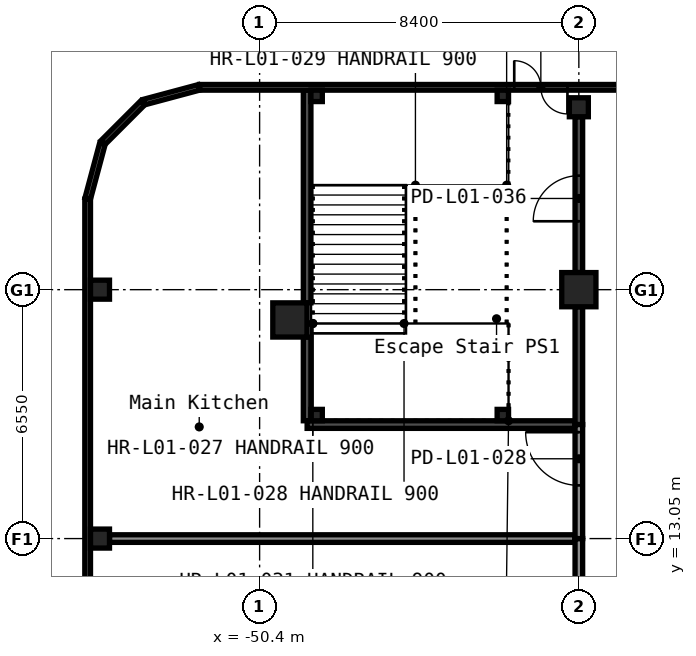
"""IFC4 building model, lengths in metres.
Left out: names, types, materials, properties, quantities, classifications, styles, units other than length and angle.
Written with IfcOpenShell. Run it as: python <this file> out.ifc"""

import sys

from ifc_helpers import new_model, si_unit, direction, frame, frame_2d, origin, origin_2d, place, context, subcontext, project, spatial, rectangle, hollow_rectangle, extrude, element, fill, save


model = new_model("IFC4")
c1 = context("Model", 3, precision=1e-05, world=origin(), true_north=direction((0.0, 1.0)))
c2 = subcontext(c1, "Body", "Model", "MODEL_VIEW")
j1 = project(units=[si_unit("LENGTHUNIT", "METRE"), si_unit("PLANEANGLEUNIT", "RADIAN")], contexts=[c1])
p1 = place(None, origin())
s1 = spatial("IfcSite", under=j1, at=p1, CompositionType="ELEMENT")
p2 = place(p1, origin())
s2 = spatial("IfcBuilding", under=s1, at=p2, CompositionType="ELEMENT")
p3 = place(p2, origin())
s3 = spatial("IfcBuildingStorey", under=s2, at=p3, CompositionType="ELEMENT", Elevation=0.0)
for number, where, z_axis, x_axis in (
    (1, (-49.603, 18.803, -0.3), (0.0, 0.0, 1.0), (1.0, 0.0, 0.0)),
    (2, (-42.0, 19.6, -0.3), (0.0, 0.0, 1.0), (1.0, 0.0, 0.0)),
):
    element("IfcColumn", number, at=place(p3, frame(where, z_axis=z_axis, x_axis=x_axis)), inside=s3, PredefinedType="COLUMN", context=c2, shape_type="SweptSolid", body=[
        extrude(hollow_rectangle(XDim=0.9, YDim=0.9, WallThickness=0.036, at=origin_2d()), origin(), (0.0, 0.0, 1.0), 8.9),
    ])
for number, where, z_axis, x_axis in (
    (3, (-42.0, 24.4, -0.3), (0.0, 0.0, 1.0), (1.0, 0.0, 0.0)),
    (4, (-54.6, 13.05, -0.3), (0.0, 0.0, 1.0), (1.0, 0.0, 0.0)),
    (5, (-54.6, 19.6, -0.3), (0.0, 0.0, 1.0), (1.0, 0.0, 0.0)),
):
    element("IfcColumn", number, at=place(p3, frame(where, z_axis=z_axis, x_axis=x_axis)), inside=s3, PredefinedType="COLUMN", context=c2, shape_type="SweptSolid", body=[
        extrude(hollow_rectangle(XDim=0.5, YDim=0.5, WallThickness=0.019, InnerFilletRadius=0.029, OuterFilletRadius=0.048, at=origin_2d()), origin(), (0.0, 0.0, 1.0), 8.9),
    ])
p4 = place(p3, frame((-54.35, 13.05, 0.0), z_axis=(0.0, 0.0, 1.0), x_axis=(1.0, 0.0, 0.0)))
e6 = element("IfcWall", 6, at=p4, inside=s3, PredefinedType="PARTITIONING", context=c2, shape_type="SweptSolid", body=[
    extrude(rectangle(XDim=12.25, YDim=0.2, at=frame_2d((6.125, 0.0))), origin(), (0.0, 0.0, 1.0), 8.6),
])
p5 = place(p3, frame((-49.15, 16.15, 0.0), z_axis=(0.0, 0.0, 1.0), x_axis=(0.0, 1.0, 0.0)))
e7 = element("IfcWall", 7, at=p5, inside=s3, PredefinedType="SHEAR", context=c2, shape_type="SweptSolid", body=[
    extrude(rectangle(XDim=2.203, YDim=0.2, at=frame_2d((1.102, 0.0))), origin(), (0.0, 0.0, 1.0), 8.6),
])
p6 = place(p3, frame((-49.15, 19.253, 0.0), z_axis=(0.0, 0.0, 1.0), x_axis=(0.0, 1.0, 0.0)))
e8 = element("IfcWall", 8, at=p6, inside=s3, PredefinedType="SHEAR", context=c2, shape_type="SweptSolid", body=[
    extrude(rectangle(XDim=5.597, YDim=0.2, at=frame_2d((2.798, 0.0))), origin(), (0.0, 0.0, 1.0), 8.6),
])
p7 = place(p3, frame((-42.1, 16.05, 0.0), z_axis=(0.0, 0.0, 1.0), x_axis=(-1.0, 0.0, 0.0)))
e9 = element("IfcWall", 9, at=p7, inside=s3, PredefinedType="SHEAR", context=c2, shape_type="SweptSolid", body=[
    extrude(rectangle(XDim=7.05, YDim=0.2, at=frame_2d((3.525, 0.0))), origin(), (0.0, 0.0, 1.0), 8.6),
])
p8 = place(p3, frame((-42.0, 24.15, 0.0), z_axis=(0.0, 0.0, 1.0), x_axis=(0.0, -1.0, 0.0)))
e10 = element("IfcWall", 10, at=p8, inside=s3, PredefinedType="SHEAR", context=c2, shape_type="SweptSolid", body=[
    extrude(rectangle(XDim=4.1, YDim=0.2, at=frame_2d((2.05, 0.0))), origin(), (0.0, 0.0, 1.0), 8.6),
])
p9 = place(p8, frame((1.55, 0.0, 0.0)))
e11 = element("IfcOpeningElement", 11, at=p9, cuts=e10, PredefinedType="OPENING", context=c2, shape_type="SweptSolid", body=[
    extrude(rectangle(XDim=1.2, YDim=2.1, at=frame_2d((0.6, 1.05))), frame((0.0, 0.11, 0.0), z_axis=(0.0, -1.0, 0.0), x_axis=(1.0, 0.0, 0.0)), (0.0, 0.0, 1.0), 0.22),
])
p10 = place(p3, frame((-42.0, 19.15, 0.0), z_axis=(0.0, 0.0, 1.0), x_axis=(0.0, -1.0, 0.0)))
e12 = element("IfcWall", 12, at=p10, inside=s3, PredefinedType="SHEAR", context=c2, shape_type="SweptSolid", body=[
    extrude(rectangle(XDim=3.1, YDim=0.2, at=frame_2d((1.55, 0.0))), origin(), (0.0, 0.0, 1.0), 8.6),
])
p11 = place(p3, frame((-42.0, 7.0, 0.0), z_axis=(0.0, 0.0, 1.0), x_axis=(0.0, 1.0, 0.0)))
e13 = element("IfcWall", 13, at=p11, inside=s3, PredefinedType="PARTITIONING", context=c2, shape_type="SweptSolid", body=[
    extrude(rectangle(XDim=6.05, YDim=0.2, at=frame_2d((3.025, 0.0))), origin(), (0.0, 0.0, 1.0), 8.6),
])
p12 = place(p3, frame((-42.0, 13.05, 0.0), z_axis=(0.0, 0.0, 1.0), x_axis=(0.0, 1.0, 0.0)))
e14 = element("IfcWall", 14, at=p12, inside=s3, PredefinedType="PARTITIONING", context=c2, shape_type="SweptSolid", body=[
    extrude(rectangle(XDim=3.0, YDim=0.2, at=frame_2d((1.5, 0.0))), origin(), (0.0, 0.0, 1.0), 8.6),
])
p13 = place(p12, frame((1.4, 0.0, 0.0)))
e15 = element("IfcOpeningElement", 15, at=p13, cuts=e14, PredefinedType="OPENING", context=c2, shape_type="SweptSolid", body=[
    extrude(rectangle(XDim=1.4, YDim=2.1, at=frame_2d((0.7, 1.05))), frame((0.0, 0.11, 0.0), z_axis=(0.0, -1.0, 0.0), x_axis=(1.0, 0.0, 0.0)), (0.0, 0.0, 1.0), 0.22),
])
p14 = place(p3, frame((-54.925, -21.98, 0.0), z_axis=(0.0, 0.0, 1.0), x_axis=(0.0, 1.0, 0.0)))
e16 = element("IfcWall", 16, at=p14, inside=s3, PredefinedType="STANDARD", context=c2, shape_type="SweptSolid", body=[
    extrude(rectangle(XDim=43.96, YDim=0.15, at=frame_2d((21.98, 0.0))), origin(), (0.0, 0.0, 1.0), 8.6),
])
p15 = place(p14, frame((18.03, 0.0, 0.0)))
e17 = element("IfcOpeningElement", 17, at=p15, cuts=e16, PredefinedType="OPENING", context=c2, shape_type="SweptSolid", body=[
    extrude(rectangle(XDim=1.4, YDim=2.1, at=frame_2d((0.7, 1.05))), frame((0.0, 0.085, 0.0), z_axis=(0.0, -1.0, 0.0), x_axis=(1.0, 0.0, 0.0)), (0.0, 0.0, 1.0), 0.17),
])
p16 = place(p14, frame((23.48, 0.0, 0.0)))
e18 = element("IfcOpeningElement", 18, at=p16, cuts=e16, PredefinedType="OPENING", context=c2, shape_type="SweptSolid", body=[
    extrude(rectangle(XDim=3.5, YDim=3.5, at=frame_2d((1.75, 1.75))), frame((0.0, 0.085, 0.0), z_axis=(0.0, -1.0, 0.0), x_axis=(1.0, 0.0, 0.0)), (0.0, 0.0, 1.0), 0.17),
])
p17 = place(p3, frame((-54.922, 22.0, 0.0), z_axis=(0.0, 0.0, 1.0), x_axis=(0.258741535379, 0.965946591624, 0.0)))
e19 = element("IfcWall", 19, at=p17, inside=s3, PredefinedType="STANDARD", context=c2, shape_type="SweptSolid", body=[
    extrude(rectangle(XDim=1.493, YDim=0.15, at=frame_2d((0.746, 0.0))), origin(), (0.0, 0.0, 1.0), 8.6),
])
p18 = place(p3, frame((-54.517, 23.475, 0.0), z_axis=(0.0, 0.0, 1.0), x_axis=(0.707106781187, 0.707106781187, 0.0)))
e20 = element("IfcWall", 20, at=p18, inside=s3, PredefinedType="STANDARD", context=c2, shape_type="SweptSolid", body=[
    extrude(rectangle(XDim=1.473, YDim=0.15, at=frame_2d((0.736, 0.0))), origin(), (0.0, 0.0, 1.0), 8.6),
])
p19 = place(p3, frame((-53.442, 24.536, 0.0), z_axis=(0.0, 0.0, 1.0), x_axis=(0.965946591624, 0.258741535379, 0.0)))
e21 = element("IfcWall", 21, at=p19, inside=s3, PredefinedType="STANDARD", context=c2, shape_type="SweptSolid", body=[
    extrude(rectangle(XDim=1.493, YDim=0.15, at=frame_2d((0.746, 0.0))), origin(), (0.0, 0.0, 1.0), 8.6),
])
p20 = place(p3, frame((-51.98, 24.925, 0.0), z_axis=(0.0, 0.0, 1.0), x_axis=(1.0, 0.0, 0.0)))
e22 = element("IfcWall", 22, at=p20, inside=s3, PredefinedType="STANDARD", context=c2, shape_type="SweptSolid", body=[
    extrude(rectangle(XDim=12.98, YDim=0.15, at=frame_2d((6.49, 0.0))), origin(), (0.0, 0.0, 1.0), 8.6),
])
p21 = place(p20, frame((8.28, 0.0, 0.0)))
e23 = element("IfcOpeningElement", 23, at=p21, cuts=e22, PredefinedType="OPENING", context=c2, shape_type="SweptSolid", body=[
    extrude(rectangle(XDim=1.4, YDim=2.1, at=frame_2d((0.7, 1.05))), frame((0.0, 0.085, 0.0), z_axis=(0.0, -1.0, 0.0), x_axis=(1.0, 0.0, 0.0)), (0.0, 0.0, 1.0), 0.17),
])
for number, where, z_axis, x_axis in (
    (24, (-48.9, 24.7, 0.0), (0.0, 0.0, 1.0), (1.0, 0.0, 0.0)),
    (25, (-44.0, 24.7, 0.0), (0.0, 0.0, 1.0), (1.0, 0.0, 0.0)),
    (26, (-48.9, 16.3, 0.0), (0.0, 0.0, 1.0), (1.0, 0.0, 0.0)),
    (27, (-44.0, 16.3, 0.0), (0.0, 0.0, 1.0), (1.0, 0.0, 0.0)),
):
    element("IfcColumn", number, at=place(p3, frame(where, z_axis=z_axis, x_axis=x_axis)), inside=s3, PredefinedType="COLUMN", context=c2, shape_type="SweptSolid", body=[
        extrude(rectangle(XDim=0.3, YDim=0.3, at=origin_2d()), origin(), (0.0, 0.0, 1.0), 8.7),
    ])
p22 = place(p13, origin())
e28 = element("IfcDoor", 28, at=p22, inside=s3, OperationType="SINGLE_SWING_LEFT", PredefinedType="DOOR", context=c2, shape_type="SweptSolid", body=[
    extrude(rectangle(XDim=1.4, YDim=2.1, at=frame_2d((0.7, 1.05))), frame((0.0, 0.025, 0.0), z_axis=(0.0, -1.0, 0.0), x_axis=(1.0, 0.0, 0.0)), (0.0, 0.0, 1.0), 0.05),
])
fill(e15, e28)
p23 = place(p9, origin())
e29 = element("IfcDoor", 29, at=p23, inside=s3, OperationType="SINGLE_SWING_RIGHT", PredefinedType="DOOR", context=c2, shape_type="SweptSolid", body=[
    extrude(rectangle(XDim=1.2, YDim=2.1, at=frame_2d((0.6, 1.05))), frame((0.0, 0.025, 0.0), z_axis=(0.0, -1.0, 0.0), x_axis=(1.0, 0.0, 0.0)), (0.0, 0.0, 1.0), 0.05),
])
fill(e11, e29)
p24 = place(p21, origin())
e30 = element("IfcDoor", 30, at=p24, inside=s3, OperationType="DOUBLE_DOOR_SINGLE_SWING", PredefinedType="DOOR", context=c2, shape_type="SweptSolid", body=[
    extrude(rectangle(XDim=1.4, YDim=2.1, at=frame_2d((0.7, 1.05))), frame((0.0, 0.025, 0.0), z_axis=(0.0, -1.0, 0.0), x_axis=(1.0, 0.0, 0.0)), (0.0, 0.0, 1.0), 0.05),
])
fill(e23, e30)
save(model, sys.argv[1])
